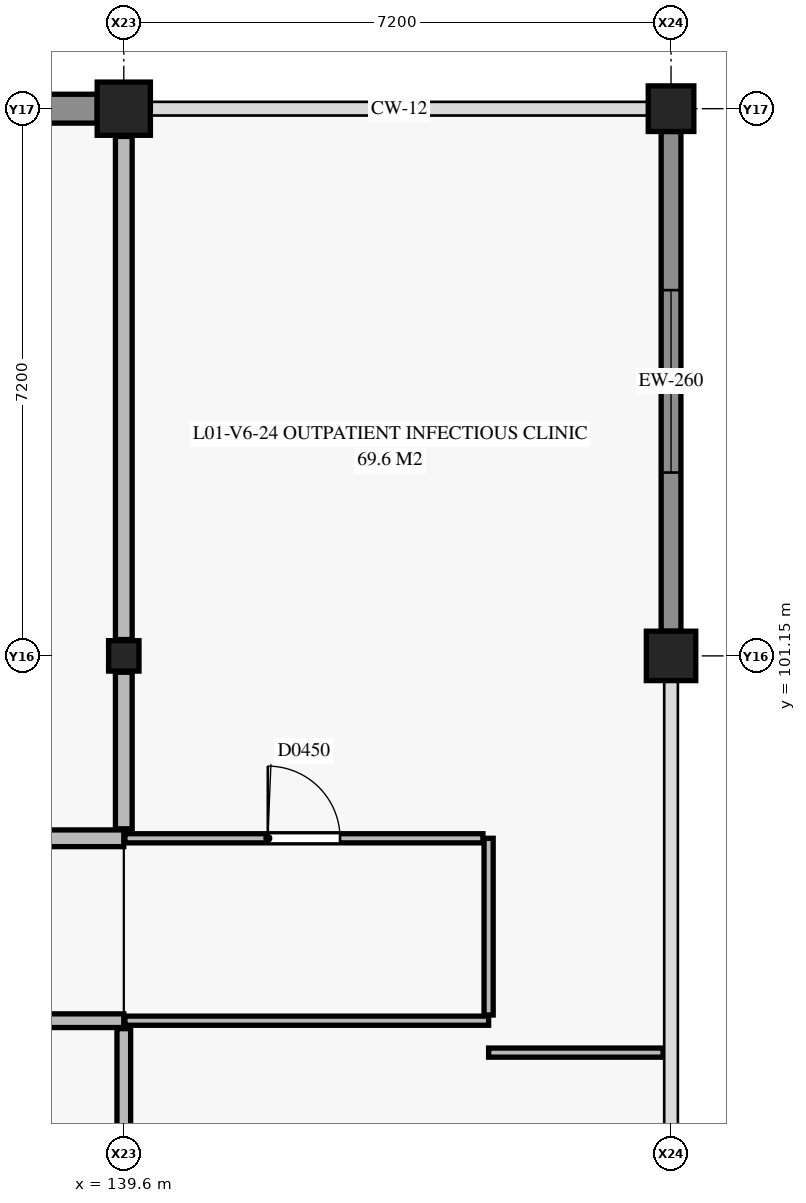
"""IFC4 building model, lengths in metres.
Left out: names, types, materials, properties, quantities, classifications, styles, units other than length and angle.
Written with IfcOpenShell. Run it as: python <this file> out.ifc"""

import sys

from ifc_helpers import new_model, si_unit, direction, frame, frame_2d, origin, origin_2d, place, context, subcontext, project, spatial, rectangle, circle, extrude, element, fill, save


model = new_model("IFC4")
c1 = context("Model", 3, precision=1e-05, world=origin(), true_north=direction((0.0, 1.0)))
c2 = subcontext(c1, "Body", "Model", "MODEL_VIEW")
j1 = project(units=[si_unit("LENGTHUNIT", "METRE"), si_unit("PLANEANGLEUNIT", "RADIAN")], contexts=[c1])
p1 = place(None, origin())
s1 = spatial("IfcSite", under=j1, at=p1, CompositionType="ELEMENT")
p2 = place(p1, origin())
s2 = spatial("IfcBuilding", under=s1, at=p2, CompositionType="ELEMENT")
p3 = place(p2, frame((0.0, 0.0, 4.8)))
s3 = spatial("IfcBuildingStorey", under=s2, at=p3, CompositionType="ELEMENT", Elevation=4.8)
p4 = place(p3, frame((139.6, 101.15, 0.0), z_axis=(0.0, 0.0, 1.0), x_axis=(1.0, 0.0, 0.0)))
e1 = element("IfcColumn", 1, at=p4, inside=s3, PredefinedType="COLUMN", context=c2, shape_type="SweptSolid", body=[
    extrude(rectangle(XDim=0.4, YDim=0.4, at=origin_2d()), origin(), (0.0, 0.0, 1.0), 4.2),
])
p5 = place(p3, frame((139.6, 108.35, 0.0), z_axis=(0.0, 0.0, 1.0), x_axis=(1.0, 0.0, 0.0)))
e2 = element("IfcColumn", 2, at=p5, inside=s3, PredefinedType="COLUMN", context=c2, shape_type="SweptSolid", body=[
    extrude(circle(Radius=0.35, at=origin_2d()), origin(), (0.0, 0.0, 1.0), 4.2),
])
p6 = place(p3, frame((146.8, 101.15, 0.0), z_axis=(0.0, 0.0, 1.0), x_axis=(1.0, 0.0, 0.0)))
e3 = element("IfcColumn", 3, at=p6, inside=s3, PredefinedType="COLUMN", context=c2, shape_type="SweptSolid", body=[
    extrude(rectangle(XDim=0.65, YDim=0.65, at=origin_2d()), origin(), (0.0, 0.0, 1.0), 4.2),
])
p7 = place(p3, frame((146.8, 108.35, 0.0), z_axis=(0.0, 0.0, 1.0), x_axis=(1.0, 0.0, 0.0)))
e4 = element("IfcColumn", 4, at=p7, inside=s3, PredefinedType="COLUMN", context=c2, shape_type="SweptSolid", body=[
    extrude(rectangle(XDim=0.6, YDim=0.6, at=origin_2d()), origin(), (0.0, 0.0, 1.0), 4.2),
])
p8 = place(p3, frame((136.17, 108.35, 0.0), z_axis=(0.0, 0.0, 1.0), x_axis=(1.0, 0.0, 0.0)))
e5 = element("IfcWall", 5, at=p8, inside=s3, PredefinedType="USERDEFINED", context=c2, shape_type="SweptSolid", body=[
    extrude(rectangle(XDim=3.08, YDim=0.38, at=frame_2d((1.54, 0.0))), origin(), (0.0, 0.0, 1.0), 3.13),
])
p9 = place(p8, frame((0.94, 0.0, 0.9)))
e6 = element("IfcOpeningElement", 6, at=p9, cuts=e5, PredefinedType="OPENING", context=c2, shape_type="SweptSolid", body=[
    extrude(rectangle(XDim=1.2, YDim=1.5, at=frame_2d((0.6, 0.75))), frame((0.0, 0.2, 0.0), z_axis=(0.0, -1.0, 0.0), x_axis=(1.0, 0.0, 0.0)), (0.0, 0.0, 1.0), 0.4),
])
p10 = place(p3, frame((146.8, 108.05, 0.0), z_axis=(0.0, 0.0, 1.0), x_axis=(0.0, -1.0, 0.0)))
e7 = element("IfcWall", 7, at=p10, inside=s3, PredefinedType="SOLIDWALL", context=c2, shape_type="SweptSolid", body=[
    extrude(rectangle(XDim=6.575, YDim=0.26, at=frame_2d((3.288, 0.0))), origin(), (0.0, 0.0, 1.0), 3.13),
])
p11 = place(p10, frame((2.087, 0.0, 0.9)))
e8 = element("IfcOpeningElement", 8, at=p11, cuts=e7, PredefinedType="OPENING", context=c2, shape_type="SweptSolid", body=[
    extrude(rectangle(XDim=2.4, YDim=1.8, at=frame_2d((1.2, 0.9))), frame((0.0, 0.14, 0.0), z_axis=(0.0, -1.0, 0.0), x_axis=(1.0, 0.0, 0.0)), (0.0, 0.0, 1.0), 0.28),
])
p12 = place(p3, frame((135.665, 98.75, 0.0), z_axis=(0.0, 0.0, 1.0), x_axis=(1.0, 0.0, 0.0)))
e9 = element("IfcWall", 9, at=p12, inside=s3, PredefinedType="PARTITIONING", context=c2, shape_type="SweptSolid", body=[
    extrude(rectangle(XDim=3.935, YDim=0.22, at=frame_2d((1.968, 0.0))), origin(), (0.0, 0.0, 1.0), 3.355),
])
p13 = place(p12, frame((1.268, 0.0, 0.0)))
e10 = element("IfcOpeningElement", 10, at=p13, cuts=e9, PredefinedType="OPENING", context=c2, shape_type="SweptSolid", body=[
    extrude(rectangle(XDim=1.4, YDim=2.2, at=frame_2d((0.7, 1.1))), frame((0.0, 0.12, 0.0), z_axis=(0.0, -1.0, 0.0), x_axis=(1.0, 0.0, 0.0)), (0.0, 0.0, 1.0), 0.24),
])
p14 = place(p3, frame((135.665, 96.35, 0.0), z_axis=(0.0, 0.0, 1.0), x_axis=(1.0, 0.0, 0.0)))
e11 = element("IfcWall", 11, at=p14, inside=s3, PredefinedType="PLUMBINGWALL", context=c2, shape_type="SweptSolid", body=[
    extrude(rectangle(XDim=3.935, YDim=0.18, at=frame_2d((1.968, 0.0))), origin(), (0.0, 0.0, 1.0), 3.355),
])
p15 = place(p14, frame((1.492, 0.0, 0.0)))
e12 = element("IfcOpeningElement", 12, at=p15, cuts=e11, PredefinedType="OPENING", context=c2, shape_type="SweptSolid", body=[
    extrude(rectangle(XDim=0.95, YDim=2.1, at=frame_2d((0.475, 1.05))), frame((0.0, 0.1, 0.0), z_axis=(0.0, -1.0, 0.0), x_axis=(1.0, 0.0, 0.0)), (0.0, 0.0, 1.0), 0.2),
])
p16 = place(p3, frame((139.615, 96.35, 0.0), z_axis=(0.0, 0.0, 1.0), x_axis=(1.0, 0.0, 0.0)))
e13 = element("IfcWall", 13, at=p16, inside=s3, PredefinedType="PARTITIONING", context=c2, shape_type="SweptSolid", body=[
    extrude(rectangle(XDim=4.785, YDim=0.12, at=frame_2d((2.393, 0.0))), origin(), (0.0, 0.0, 1.0), 3.355),
])
p17 = place(p3, frame((144.4, 96.425, 0.0), z_axis=(0.0, 0.0, 1.0), x_axis=(0.0, 1.0, 0.0)))
e14 = element("IfcWall", 14, at=p17, inside=s3, PredefinedType="PARTITIONING", context=c2, shape_type="SweptSolid", body=[
    extrude(rectangle(XDim=2.325, YDim=0.12, at=frame_2d((1.163, 0.0))), origin(), (0.0, 0.0, 1.0), 3.515),
])
p18 = place(p3, frame((139.615, 98.75, 0.0), z_axis=(0.0, 0.0, 1.0), x_axis=(1.0, 0.0, 0.0)))
e15 = element("IfcWall", 15, at=p18, inside=s3, PredefinedType="PARTITIONING", context=c2, shape_type="SweptSolid", body=[
    extrude(rectangle(XDim=4.71, YDim=0.12, at=frame_2d((2.355, 0.0))), origin(), (0.0, 0.0, 1.0), 3.355),
])
p19 = place(p18, frame((1.88, 0.0, 0.0)))
e16 = element("IfcOpeningElement", 16, at=p19, cuts=e15, PredefinedType="OPENING", context=c2, shape_type="SweptSolid", body=[
    extrude(rectangle(XDim=0.95, YDim=2.1, at=frame_2d((0.475, 1.05))), frame((0.0, 0.07, 0.0), z_axis=(0.0, -1.0, 0.0), x_axis=(1.0, 0.0, 0.0)), (0.0, 0.0, 1.0), 0.14),
])
p20 = place(p3, frame((139.6, 98.875, 0.0), z_axis=(0.0, 0.0, 1.0), x_axis=(0.0, 1.0, 0.0)))
e17 = element("IfcWall", 17, at=p20, inside=s3, PredefinedType="PARTITIONING", context=c2, shape_type="SweptSolid", body=[
    extrude(rectangle(XDim=2.06, YDim=0.22, at=frame_2d((1.03, 0.0))), origin(), (0.0, 0.0, 1.0), 3.355),
])
p21 = place(p3, frame((139.6, 101.365, 0.0), z_axis=(0.0, 0.0, 1.0), x_axis=(0.0, 1.0, 0.0)))
e18 = element("IfcWall", 18, at=p21, inside=s3, PredefinedType="PARTITIONING", context=c2, shape_type="SweptSolid", body=[
    extrude(rectangle(XDim=6.62, YDim=0.22, at=frame_2d((3.31, 0.0))), origin(), (0.0, 0.0, 1.0), 3.385),
])
p22 = place(p3, frame((139.6, 94.19, 0.0), z_axis=(0.0, 0.0, 1.0), x_axis=(0.0, 1.0, 0.0)))
e19 = element("IfcWall", 19, at=p22, inside=s3, PredefinedType="PLUMBINGWALL", context=c2, shape_type="SweptSolid", body=[
    extrude(rectangle(XDim=2.055, YDim=0.18, at=frame_2d((1.028, 0.0))), origin(), (0.0, 0.0, 1.0), 3.355),
])
p23 = place(p3, frame((144.4, 95.93, 0.0), z_axis=(0.0, 0.0, 1.0), x_axis=(1.0, 0.0, 0.0)))
e20 = element("IfcWall", 20, at=p23, inside=s3, PredefinedType="PARTITIONING", context=c2, shape_type="SweptSolid", body=[
    extrude(rectangle(XDim=2.295, YDim=0.12, at=frame_2d((1.147, 0.0))), origin(), (0.0, 0.0, 1.0), 3.235),
])
p24 = place(p11, origin())
e21 = element("IfcWindow", 21, at=p24, inside=s3, PartitioningType="SINGLE_PANEL", PredefinedType="WINDOW", context=c2, shape_type="SweptSolid", body=[
    extrude(rectangle(XDim=2.4, YDim=1.8, at=frame_2d((1.2, 0.9))), frame((0.0, 0.03, 0.0), z_axis=(0.0, -1.0, 0.0), x_axis=(1.0, 0.0, 0.0)), (0.0, 0.0, 1.0), 0.06),
])
fill(e8, e21)
p25 = place(p19, origin())
e22 = element("IfcDoor", 22, at=p25, inside=s3, OperationType="SINGLE_SWING_LEFT", PredefinedType="DOOR", context=c2, shape_type="SweptSolid", body=[
    extrude(rectangle(XDim=0.95, YDim=2.1, at=frame_2d((0.475, 1.05))), frame((0.0, 0.025, 0.0), z_axis=(0.0, -1.0, 0.0), x_axis=(1.0, 0.0, 0.0)), (0.0, 0.0, 1.0), 0.05),
])
fill(e16, e22)
save(model, sys.argv[1])
